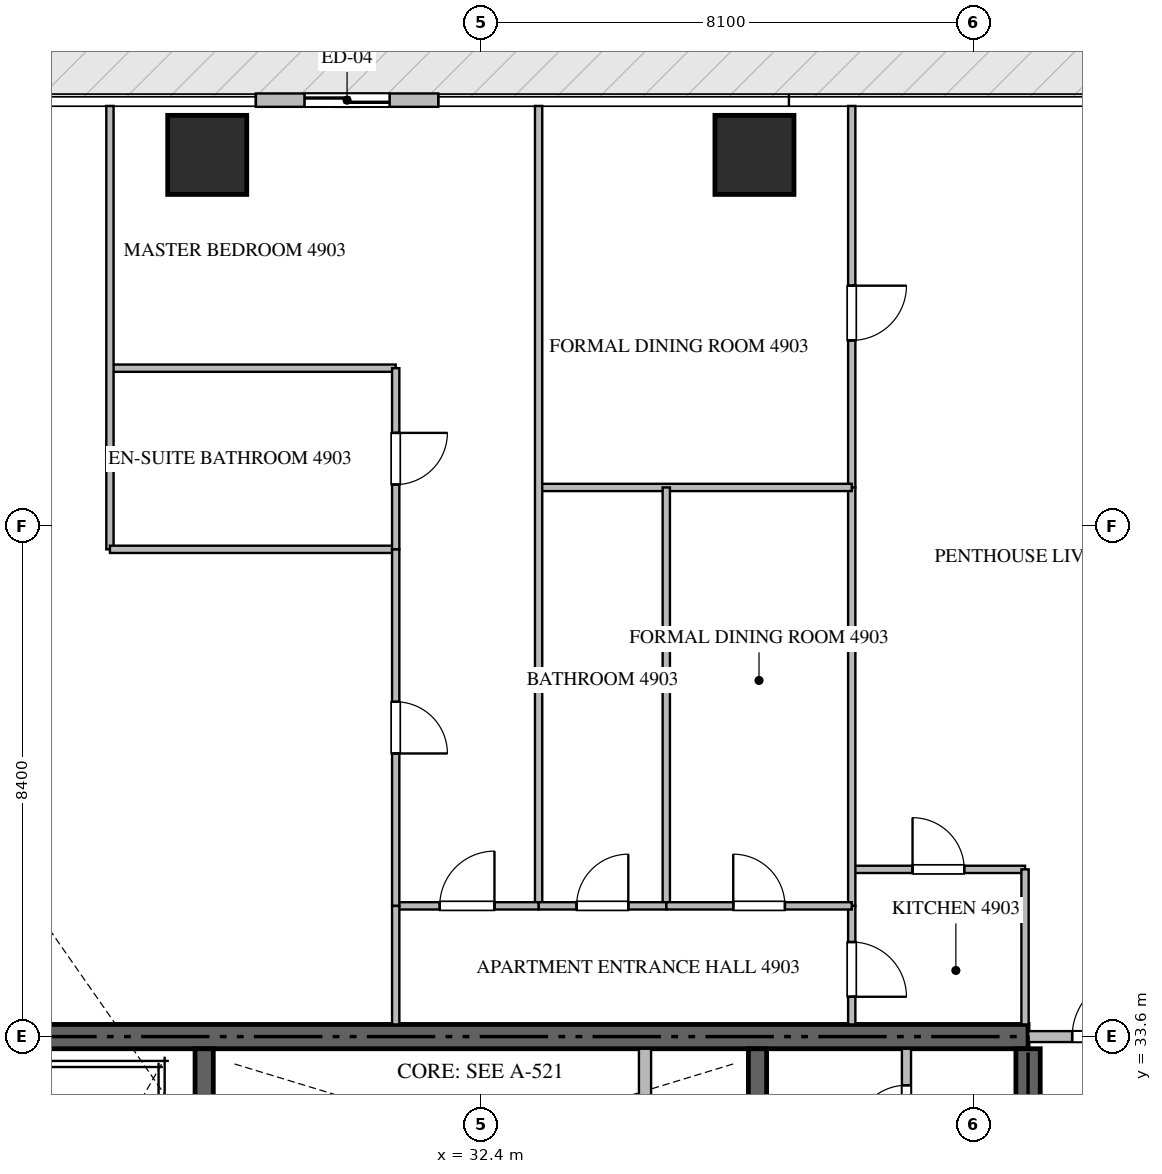
"""IFC4 building model, lengths in metres.
Left out: names, types, materials, properties, quantities, classifications, styles, units other than length and angle.
Written with IfcOpenShell. Run it as: python <this file> out.ifc"""

import sys

from ifc_helpers import new_model, si_unit, direction, frame, frame_2d, origin, origin_2d, place, context, subcontext, project, spatial, rectangle, extrude, source, transform, mapped, element, fill, save


model = new_model("IFC4")
c1 = context("Model", 3, precision=1e-05, world=origin(), true_north=direction((0.0, 1.0)))
c2 = subcontext(c1, "Body", "Model", "MODEL_VIEW")
j1 = project(units=[si_unit("LENGTHUNIT", "METRE"), si_unit("PLANEANGLEUNIT", "RADIAN")], contexts=[c1])
p1 = place(None, origin())
s1 = spatial("IfcSite", under=j1, at=p1, CompositionType="ELEMENT")
p2 = place(p1, origin())
s2 = spatial("IfcBuilding", under=s1, at=p2, CompositionType="ELEMENT")
p3 = place(p2, frame((0.0, 0.0, 195.15)))
s3 = spatial("IfcBuildingStorey", under=s2, at=p3, CompositionType="ELEMENT", Elevation=195.15)
p4 = place(p3, frame((41.4, 33.6, -0.26), z_axis=(0.0, 0.0, 1.0), x_axis=(-1.0, 0.0, 0.0)))
e1 = element("IfcWall", 1, at=p4, inside=s3, PredefinedType="SHEAR", context=c2, shape_type="SweptSolid", body=[
    extrude(rectangle(XDim=18.0, YDim=0.4, at=frame_2d((9.0, 0.0))), origin(), (0.0, 0.0, 1.0), 3.568),
])
p5 = place(p3, frame((41.4, 27.75, -0.26), z_axis=(0.0, 0.0, 1.0), x_axis=(0.0, 1.0, 0.0)))
e2 = element("IfcWall", 2, at=p5, inside=s3, PredefinedType="SHEAR", context=c2, shape_type="SweptSolid", body=[
    extrude(rectangle(XDim=5.65, YDim=0.4, at=frame_2d((2.825, 0.0))), origin(), (0.0, 0.0, 1.0), 3.568),
])
p6 = place(p3, frame((27.85, 23.55, -0.26), z_axis=(0.0, 0.0, 1.0), x_axis=(0.0, 1.0, 0.0)))
e3 = element("IfcWall", 3, at=p6, inside=s3, PredefinedType="SHEAR", context=c2, shape_type="SweptSolid", body=[
    extrude(rectangle(XDim=9.85, YDim=0.3, at=frame_2d((4.925, 0.0))), origin(), (0.0, 0.0, 1.0), 3.568),
])
p7 = place(p3, frame((36.95, 27.05, -0.26), z_axis=(0.0, 0.0, 1.0), x_axis=(0.0, 1.0, 0.0)))
e4 = element("IfcWall", 4, at=p7, inside=s3, PredefinedType="SHEAR", context=c2, shape_type="SweptSolid", body=[
    extrude(rectangle(XDim=6.35, YDim=0.3, at=frame_2d((3.175, 0.0))), origin(), (0.0, 0.0, 1.0), 3.568),
])
m1 = source(origin(), c2, "Body", "SweptSolid", [
    extrude(rectangle(XDim=1.3, YDim=1.3, at=origin_2d()), origin(), (0.0, 0.0, 1.0), 3.57),
])
for number, where, z_axis, x_axis in (
    (5, (27.9, 48.1, -0.26), (0.0, 0.0, 1.0), (1.0, 0.0, 0.0)),
    (6, (36.9, 48.1, -0.26), (0.0, 0.0, 1.0), (1.0, 0.0, 0.0)),
):
    element("IfcColumn", number, at=place(p3, frame(where, z_axis=z_axis, x_axis=x_axis)), inside=s3, PredefinedType="COLUMN", context=c2, shape_type="MappedRepresentation", body=[
        mapped(m1, transform((0.0, 0.0, 0.0), scale=1.0)),
    ])
p8 = place(p3, frame((31.7, 49.0, 0.0), z_axis=(0.0, 0.0, 1.0), x_axis=(-1.0, 0.0, 0.0)))
e7 = element("IfcWall", 7, at=p8, inside=s3, PredefinedType="ELEMENTEDWALL", context=c2, shape_type="SweptSolid", body=[
    extrude(rectangle(XDim=3.0, YDim=0.22, at=frame_2d((1.5, 0.0))), origin(), (0.0, 0.0, 1.0), 3.295),
])
p9 = place(p8, frame((0.8, 0.0, 0.0)))
e8 = element("IfcOpeningElement", 8, at=p9, cuts=e7, PredefinedType="OPENING", context=c2, shape_type="SweptSolid", body=[
    extrude(rectangle(XDim=1.4, YDim=2.25, at=frame_2d((0.7, 1.125))), frame((0.0, 0.12, 0.0), z_axis=(0.0, -1.0, 0.0), x_axis=(1.0, 0.0, 0.0)), (0.0, 0.0, 1.0), 0.24),
])
p10 = place(p3, frame((35.1, 30.75, 0.0), z_axis=(0.0, 0.0, 1.0), x_axis=(0.0, 1.0, 0.0)))
e9 = element("IfcWall", 9, at=p10, inside=s3, PredefinedType="STANDARD", context=c2, shape_type="SweptSolid", body=[
    extrude(rectangle(XDim=2.65, YDim=0.2, at=frame_2d((1.325, 0.0))), origin(), (0.0, 0.0, 1.0), 3.31),
])
p11 = place(p3, frame((39.4, 31.35, 0.0), z_axis=(0.0, 0.0, 1.0), x_axis=(0.0, 1.0, 0.0)))
e10 = element("IfcWall", 10, at=p11, inside=s3, PredefinedType="PARTITIONING", context=c2, shape_type="SweptSolid", body=[
    extrude(rectangle(XDim=2.05, YDim=0.15, at=frame_2d((1.025, 0.0))), origin(), (0.0, 0.0, 1.0), 3.31),
])
p12 = place(p11, frame((0.6, 0.0, 0.0)))
e11 = element("IfcOpeningElement", 11, at=p12, cuts=e10, PredefinedType="OPENING", context=c2, shape_type="SweptSolid", body=[
    extrude(rectangle(XDim=0.85, YDim=2.1, at=frame_2d((0.425, 1.05))), frame((0.0, 0.085, 0.0), z_axis=(0.0, -1.0, 0.0), x_axis=(1.0, 0.0, 0.0)), (0.0, 0.0, 1.0), 0.17),
])
p13 = place(p3, frame((41.402, 33.6, 0.0), z_axis=(0.0, 0.0, 1.0), x_axis=(1.0, 0.0, 0.0)))
e12 = element("IfcWall", 12, at=p13, inside=s3, PredefinedType="PARTITIONING", context=c2, shape_type="SweptSolid", body=[
    extrude(rectangle(XDim=2.446, YDim=0.18, at=frame_2d((1.223, 0.0))), origin(), (0.0, 0.0, 1.0), 3.31),
])
p14 = place(p13, frame((0.723, 0.0, 0.0)))
e13 = element("IfcOpeningElement", 13, at=p14, cuts=e12, PredefinedType="OPENING", context=c2, shape_type="SweptSolid", body=[
    extrude(rectangle(XDim=1.0, YDim=2.15, at=frame_2d((0.5, 1.075))), frame((0.0, 0.1, 0.0), z_axis=(0.0, -1.0, 0.0), x_axis=(1.0, 0.0, 0.0)), (0.0, 0.0, 1.0), 0.2),
])
p15 = place(p3, frame((38.5, 36.35, 0.0), z_axis=(0.0, 0.0, 1.0), x_axis=(1.0, 0.0, 0.0)))
e14 = element("IfcWall", 14, at=p15, inside=s3, PredefinedType="PARTITIONING", context=c2, shape_type="SweptSolid", body=[
    extrude(rectangle(XDim=2.85, YDim=0.12, at=frame_2d((1.425, 0.0))), origin(), (0.0, 0.0, 1.0), 2.145),
])
p16 = place(p15, frame((1.0, 0.0, 0.0)))
e15 = element("IfcOpeningElement", 15, at=p16, cuts=e14, PredefinedType="OPENING", context=c2, shape_type="SweptSolid", body=[
    extrude(rectangle(XDim=0.85, YDim=2.1, at=frame_2d((0.425, 1.05))), frame((0.0, 0.07, 0.0), z_axis=(0.0, -1.0, 0.0), x_axis=(1.0, 0.0, 0.0)), (0.0, 0.0, 1.0), 0.14),
])
p17 = place(p3, frame((41.35, 36.35, 0.0), z_axis=(0.0, 0.0, 1.0), x_axis=(0.0, -1.0, 0.0)))
e16 = element("IfcWall", 16, at=p17, inside=s3, PredefinedType="PARTITIONING", context=c2, shape_type="SweptSolid", body=[
    extrude(rectangle(XDim=2.55, YDim=0.12, at=frame_2d((1.275, 0.0))), origin(), (0.0, 0.0, 1.0), 3.31),
])
p18 = place(p3, frame((38.5, 35.75, 0.0), z_axis=(0.0, 0.0, 1.0), x_axis=(0.0, -1.0, 0.0)))
e17 = element("IfcWall", 17, at=p18, inside=s3, PredefinedType="PARTITIONING", context=c2, shape_type="SweptSolid", body=[
    extrude(rectangle(XDim=1.95, YDim=0.12, at=frame_2d((0.975, 0.0))), origin(), (0.0, 0.0, 1.0), 3.31),
])
p19 = place(p18, frame((0.595, 0.0, 0.0)))
e18 = element("IfcOpeningElement", 18, at=p19, cuts=e17, PredefinedType="OPENING", context=c2, shape_type="SweptSolid", body=[
    extrude(rectangle(XDim=0.9, YDim=2.1, at=frame_2d((0.45, 1.05))), frame((0.0, 0.07, 0.0), z_axis=(0.0, -1.0, 0.0), x_axis=(1.0, 0.0, 0.0)), (0.0, 0.0, 1.0), 0.14),
])
p20 = place(p3, frame((38.5, 48.905, 0.0), z_axis=(0.0, 0.0, 1.0), x_axis=(0.0, -1.0, 0.0)))
e19 = element("IfcWall", 19, at=p20, inside=s3, PredefinedType="PARTITIONING", context=c2, shape_type="SweptSolid", body=[
    extrude(rectangle(XDim=6.274, YDim=0.12, at=frame_2d((3.137, 0.0))), origin(), (0.0, 0.0, 1.0), 3.31),
])
p21 = place(p20, frame((2.956, 0.0, 0.0)))
e20 = element("IfcOpeningElement", 20, at=p21, cuts=e19, PredefinedType="OPENING", context=c2, shape_type="SweptSolid", body=[
    extrude(rectangle(XDim=0.9, YDim=2.1, at=frame_2d((0.45, 1.05))), frame((0.0, 0.07, 0.0), z_axis=(0.0, -1.0, 0.0), x_axis=(1.0, 0.0, 0.0)), (0.0, 0.0, 1.0), 0.14),
])
p22 = place(p3, frame((38.5, 42.629, 0.0), z_axis=(0.0, 0.0, 1.0), x_axis=(0.0, -1.0, 0.0)))
e21 = element("IfcWall", 21, at=p22, inside=s3, PredefinedType="PARTITIONING", context=c2, shape_type="SweptSolid", body=[
    extrude(rectangle(XDim=6.877, YDim=0.12, at=frame_2d((3.438, 0.0))), origin(), (0.0, 0.0, 1.0), 3.31),
])
p23 = place(p3, frame((33.35, 42.631, 0.0), z_axis=(0.0, 0.0, 1.0), x_axis=(1.0, 0.0, 0.0)))
e22 = element("IfcWall", 22, at=p23, inside=s3, PredefinedType="PARTITIONING", context=c2, shape_type="SweptSolid", body=[
    extrude(rectangle(XDim=5.15, YDim=0.12, at=frame_2d((2.575, 0.0))), origin(), (0.0, 0.0, 1.0), 3.31),
])
p24 = place(p3, frame((33.35, 48.905, 0.0), z_axis=(0.0, 0.0, 1.0), x_axis=(0.0, -1.0, 0.0)))
e23 = element("IfcWall", 23, at=p24, inside=s3, PredefinedType="PARTITIONING", context=c2, shape_type="SweptSolid", body=[
    extrude(rectangle(XDim=13.155, YDim=0.12, at=frame_2d((6.578, 0.0))), origin(), (0.0, 0.0, 1.0), 3.31),
])
p25 = place(p3, frame((35.45, 42.631, 0.0), z_axis=(0.0, 0.0, 1.0), x_axis=(0.0, -1.0, 0.0)))
e24 = element("IfcWall", 24, at=p25, inside=s3, PredefinedType="PARTITIONING", context=c2, shape_type="SweptSolid", body=[
    extrude(rectangle(XDim=6.881, YDim=0.12, at=frame_2d((3.44, 0.0))), origin(), (0.0, 0.0, 1.0), 3.31),
])
p26 = place(p3, frame((33.35, 35.75, 0.0), z_axis=(0.0, 0.0, 1.0), x_axis=(1.0, 0.0, 0.0)))
e25 = element("IfcWall", 25, at=p26, inside=s3, PredefinedType="PARTITIONING", context=c2, shape_type="SweptSolid", body=[
    extrude(rectangle(XDim=2.1, YDim=0.12, at=frame_2d((1.05, 0.0))), origin(), (0.0, 0.0, 1.0), 3.31),
])
p27 = place(p26, frame((0.625, 0.0, 0.0)))
e26 = element("IfcOpeningElement", 26, at=p27, cuts=e25, PredefinedType="OPENING", context=c2, shape_type="SweptSolid", body=[
    extrude(rectangle(XDim=0.85, YDim=2.1, at=frame_2d((0.425, 1.05))), frame((0.0, 0.07, 0.0), z_axis=(0.0, -1.0, 0.0), x_axis=(1.0, 0.0, 0.0)), (0.0, 0.0, 1.0), 0.14),
])
p28 = place(p3, frame((35.452, 35.75, 0.0), z_axis=(0.0, 0.0, 1.0), x_axis=(1.0, 0.0, 0.0)))
e27 = element("IfcWall", 27, at=p28, inside=s3, PredefinedType="PARTITIONING", context=c2, shape_type="SweptSolid", body=[
    extrude(rectangle(XDim=3.048, YDim=0.12, at=frame_2d((1.524, 0.0))), origin(), (0.0, 0.0, 1.0), 3.31),
])
p29 = place(p28, frame((1.099, 0.0, 0.0)))
e28 = element("IfcOpeningElement", 28, at=p29, cuts=e27, PredefinedType="OPENING", context=c2, shape_type="SweptSolid", body=[
    extrude(rectangle(XDim=0.85, YDim=2.1, at=frame_2d((0.425, 1.05))), frame((0.0, 0.07, 0.0), z_axis=(0.0, -1.0, 0.0), x_axis=(1.0, 0.0, 0.0)), (0.0, 0.0, 1.0), 0.14),
])
p30 = place(p3, frame((31.0, 35.75, 0.0), z_axis=(0.0, 0.0, 1.0), x_axis=(1.0, 0.0, 0.0)))
e29 = element("IfcWall", 29, at=p30, inside=s3, PredefinedType="PARTITIONING", context=c2, shape_type="SweptSolid", body=[
    extrude(rectangle(XDim=2.348, YDim=0.12, at=frame_2d((1.174, 0.0))), origin(), (0.0, 0.0, 1.0), 3.31),
])
p31 = place(p30, frame((0.724, 0.0, 0.0)))
e30 = element("IfcOpeningElement", 30, at=p31, cuts=e29, PredefinedType="OPENING", context=c2, shape_type="SweptSolid", body=[
    extrude(rectangle(XDim=0.9, YDim=2.1, at=frame_2d((0.45, 1.05))), frame((0.0, 0.07, 0.0), z_axis=(0.0, -1.0, 0.0), x_axis=(1.0, 0.0, 0.0)), (0.0, 0.0, 1.0), 0.14),
])
p32 = place(p3, frame((26.3, 44.592, 0.0), z_axis=(0.0, 0.0, 1.0), x_axis=(1.0, 0.0, 0.0)))
e31 = element("IfcWall", 31, at=p32, inside=s3, PredefinedType="PARTITIONING", context=c2, shape_type="SweptSolid", body=[
    extrude(rectangle(XDim=4.7, YDim=0.12, at=frame_2d((2.35, 0.0))), origin(), (0.0, 0.0, 1.0), 3.31),
])
p33 = place(p3, frame((26.3, 48.905, 0.0), z_axis=(0.0, 0.0, 1.0), x_axis=(0.0, -1.0, 0.0)))
e32 = element("IfcWall", 32, at=p33, inside=s3, PredefinedType="PARTITIONING", context=c2, shape_type="SweptSolid", body=[
    extrude(rectangle(XDim=7.292, YDim=0.12, at=frame_2d((3.646, 0.0))), origin(), (0.0, 0.0, 1.0), 3.31),
])
p34 = place(p3, frame((26.3, 41.613, 0.0), z_axis=(0.0, 0.0, 1.0), x_axis=(1.0, 0.0, 0.0)))
e33 = element("IfcWall", 33, at=p34, inside=s3, PredefinedType="PARTITIONING", context=c2, shape_type="SweptSolid", body=[
    extrude(rectangle(XDim=4.7, YDim=0.12, at=frame_2d((2.35, 0.0))), origin(), (0.0, 0.0, 1.0), 3.31),
])
p35 = place(p3, frame((31.0, 44.592, 0.0), z_axis=(0.0, 0.0, 1.0), x_axis=(0.0, -1.0, 0.0)))
e34 = element("IfcWall", 34, at=p35, inside=s3, PredefinedType="PARTITIONING", context=c2, shape_type="SweptSolid", body=[
    extrude(rectangle(XDim=2.979, YDim=0.12, at=frame_2d((1.49, 0.0))), origin(), (0.0, 0.0, 1.0), 3.31),
])
p36 = place(p35, frame((1.064, 0.0, 0.0)))
e35 = element("IfcOpeningElement", 35, at=p36, cuts=e34, PredefinedType="OPENING", context=c2, shape_type="SweptSolid", body=[
    extrude(rectangle(XDim=0.85, YDim=2.1, at=frame_2d((0.425, 1.05))), frame((0.0, 0.07, 0.0), z_axis=(0.0, -1.0, 0.0), x_axis=(1.0, 0.0, 0.0)), (0.0, 0.0, 1.0), 0.14),
])
p37 = place(p3, frame((31.0, 41.611, 0.0), z_axis=(0.0, 0.0, 1.0), x_axis=(0.0, -1.0, 0.0)))
e36 = element("IfcWall", 36, at=p37, inside=s3, PredefinedType="PARTITIONING", context=c2, shape_type="SweptSolid", body=[
    extrude(rectangle(XDim=5.861, YDim=0.12, at=frame_2d((2.931, 0.0))), origin(), (0.0, 0.0, 1.0), 3.31),
])
p38 = place(p37, frame((2.505, 0.0, 0.0)))
e37 = element("IfcOpeningElement", 37, at=p38, cuts=e36, PredefinedType="OPENING", context=c2, shape_type="SweptSolid", body=[
    extrude(rectangle(XDim=0.85, YDim=2.1, at=frame_2d((0.425, 1.05))), frame((0.0, 0.07, 0.0), z_axis=(0.0, -1.0, 0.0), x_axis=(1.0, 0.0, 0.0)), (0.0, 0.0, 1.0), 0.14),
])
p39 = place(p3, frame((31.0, 35.748, 0.0), z_axis=(0.0, 0.0, 1.0), x_axis=(0.0, -1.0, 0.0)))
e38 = element("IfcWall", 38, at=p39, inside=s3, PredefinedType="PARTITIONING", context=c2, shape_type="SweptSolid", body=[
    extrude(rectangle(XDim=1.948, YDim=0.12, at=frame_2d((0.974, 0.0))), origin(), (0.0, 0.0, 1.0), 3.31),
])
m2 = source(origin(), c2, "Body", "SweptSolid", [
    extrude(rectangle(XDim=1.4, YDim=2.25, at=frame_2d((0.7, 1.125))), frame((0.0, 0.025, 0.0), z_axis=(0.0, -1.0, 0.0), x_axis=(1.0, 0.0, 0.0)), (0.0, 0.0, 1.0), 0.05),
])
p40 = place(p9, origin())
e39 = element("IfcDoor", 39, at=p40, inside=s3, OperationType="SLIDING_TO_LEFT", PredefinedType="DOOR", context=c2, shape_type="MappedRepresentation", body=[
    mapped(m2, transform((0.0, 0.0, 0.0), scale=1.0)),
])
fill(e8, e39)
m3 = source(origin(), c2, "Body", "SweptSolid", [
    extrude(rectangle(XDim=0.85, YDim=2.1, at=frame_2d((0.425, 1.05))), frame((0.0, 0.025, 0.0), z_axis=(0.0, -1.0, 0.0), x_axis=(1.0, 0.0, 0.0)), (0.0, 0.0, 1.0), 0.05),
])
p41 = place(p12, origin())
e40 = element("IfcDoor", 40, at=p41, inside=s3, OperationType="SINGLE_SWING_LEFT", PredefinedType="DOOR", context=c2, shape_type="MappedRepresentation", body=[
    mapped(m3, transform((0.0, 0.0, 0.0), scale=1.0)),
])
fill(e11, e40)
m4 = source(origin(), c2, "Body", "SweptSolid", [
    extrude(rectangle(XDim=1.0, YDim=2.15, at=frame_2d((0.5, 1.075))), frame((0.0, 0.025, 0.0), z_axis=(0.0, -1.0, 0.0), x_axis=(1.0, 0.0, 0.0)), (0.0, 0.0, 1.0), 0.05),
])
p42 = place(p14, origin())
e41 = element("IfcDoor", 41, at=p42, inside=s3, OperationType="SINGLE_SWING_RIGHT", PredefinedType="DOOR", context=c2, shape_type="MappedRepresentation", body=[
    mapped(m4, transform((0.0, 0.0, 0.0), scale=1.0)),
])
fill(e13, e41)
p43 = place(p16, origin())
e42 = element("IfcDoor", 42, at=p43, inside=s3, OperationType="SINGLE_SWING_LEFT", PredefinedType="DOOR", context=c2, shape_type="MappedRepresentation", body=[
    mapped(m3, transform((0.0, 0.0, 0.0), scale=1.0)),
])
fill(e15, e42)
m5 = source(origin(), c2, "Body", "SweptSolid", [
    extrude(rectangle(XDim=0.9, YDim=2.1, at=frame_2d((0.45, 1.05))), frame((0.0, 0.025, 0.0), z_axis=(0.0, -1.0, 0.0), x_axis=(1.0, 0.0, 0.0)), (0.0, 0.0, 1.0), 0.05),
])
p44 = place(p19, origin())
e43 = element("IfcDoor", 43, at=p44, inside=s3, OperationType="SINGLE_SWING_RIGHT", PredefinedType="DOOR", context=c2, shape_type="MappedRepresentation", body=[
    mapped(m5, transform((0.0, 0.0, 0.0), scale=1.0)),
])
fill(e18, e43)
p45 = place(p21, origin())
e44 = element("IfcDoor", 44, at=p45, inside=s3, OperationType="SINGLE_SWING_LEFT", PredefinedType="DOOR", context=c2, shape_type="MappedRepresentation", body=[
    mapped(m5, transform((0.0, 0.0, 0.0), scale=1.0)),
])
fill(e20, e44)
p46 = place(p27, origin())
e45 = element("IfcDoor", 45, at=p46, inside=s3, OperationType="SINGLE_SWING_RIGHT", PredefinedType="DOOR", context=c2, shape_type="MappedRepresentation", body=[
    mapped(m3, transform((0.0, 0.0, 0.0), scale=1.0)),
])
fill(e26, e45)
p47 = place(p29, origin())
e46 = element("IfcDoor", 46, at=p47, inside=s3, OperationType="SINGLE_SWING_LEFT", PredefinedType="DOOR", context=c2, shape_type="MappedRepresentation", body=[
    mapped(m3, transform((0.0, 0.0, 0.0), scale=1.0)),
])
fill(e28, e46)
p48 = place(p31, origin())
e47 = element("IfcDoor", 47, at=p48, inside=s3, OperationType="SINGLE_SWING_RIGHT", PredefinedType="DOOR", context=c2, shape_type="MappedRepresentation", body=[
    mapped(m5, transform((0.0, 0.0, 0.0), scale=1.0)),
])
fill(e30, e47)
p49 = place(p36, origin())
e48 = element("IfcDoor", 48, at=p49, inside=s3, OperationType="SINGLE_SWING_LEFT", PredefinedType="DOOR", context=c2, shape_type="MappedRepresentation", body=[
    mapped(m3, transform((0.0, 0.0, 0.0), scale=1.0)),
])
fill(e35, e48)
p50 = place(p38, origin())
e49 = element("IfcDoor", 49, at=p50, inside=s3, OperationType="SINGLE_SWING_RIGHT", PredefinedType="DOOR", context=c2, shape_type="MappedRepresentation", body=[
    mapped(m3, transform((0.0, 0.0, 0.0), scale=1.0)),
])
fill(e37, e49)
save(model, sys.argv[1])
